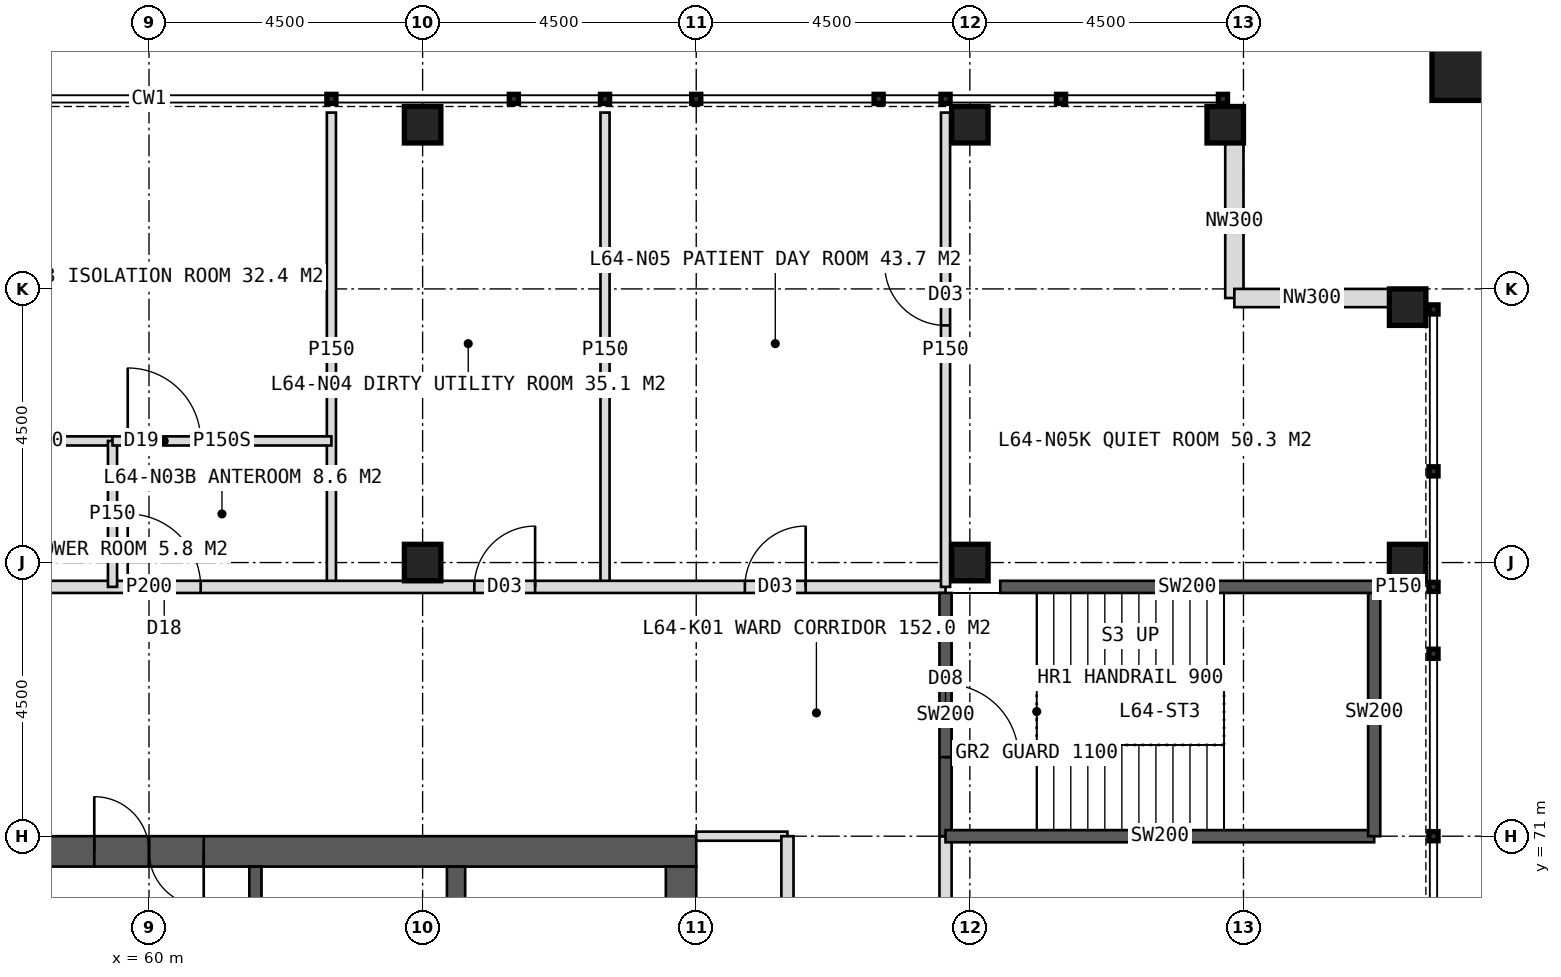
"""IFC4 building model, lengths in metres.
Left out: names, types, materials, properties, quantities, classifications, styles, units other than length and angle.
Written with IfcOpenShell. Run it as: python <this file> out.ifc"""

import sys

from ifc_helpers import new_model, si_unit, direction, frame, frame_2d, origin, origin_2d, place, context, subcontext, project, spatial, rectangle, hollow_rectangle, extrude, element, fill, save


model = new_model("IFC4")
c1 = context("Model", 3, precision=1e-05, world=origin(), true_north=direction((0.0, 1.0)))
c2 = subcontext(c1, "Body", "Model", "MODEL_VIEW")
j1 = project(units=[si_unit("LENGTHUNIT", "METRE"), si_unit("PLANEANGLEUNIT", "RADIAN")], contexts=[c1])
p1 = place(None, origin())
s1 = spatial("IfcSite", under=j1, at=p1, CompositionType="ELEMENT")
p2 = place(p1, origin())
s2 = spatial("IfcBuilding", under=s1, at=p2, CompositionType="ELEMENT")
p3 = place(p2, frame((0.0, 0.0, 266.0)))
s3 = spatial("IfcBuildingStorey", under=s2, at=p3, CompositionType="ELEMENT", Elevation=266.0)
p4 = place(p3, frame((51.0, 70.75, 0.0), z_axis=(0.0, 0.0, 1.0), x_axis=(1.0, 0.0, 0.0)))
e1 = element("IfcWall", 1, at=p4, inside=s3, PredefinedType="SHEAR", context=c2, shape_type="SweptSolid", body=[
    extrude(rectangle(XDim=18.0, YDim=0.5, at=frame_2d((9.0, 0.0))), origin(), (0.0, 0.0, 1.0), 4.0),
])
p5 = place(p4, frame((8.1, 0.0, 0.0)))
e2 = element("IfcOpeningElement", 2, at=p5, cuts=e1, PredefinedType="OPENING", context=c2, shape_type="SweptSolid", body=[
    extrude(rectangle(XDim=1.8, YDim=2.2, at=frame_2d((0.9, 1.1))), frame((0.0, 0.26, 0.0), z_axis=(0.0, -1.0, 0.0), x_axis=(1.0, 0.0, 0.0)), (0.0, 0.0, 1.0), 0.52),
])
p6 = place(p3, frame((68.75, 53.5, 0.0), z_axis=(0.0, 0.0, 1.0), x_axis=(0.0, 1.0, 0.0)))
e3 = element("IfcWall", 3, at=p6, inside=s3, PredefinedType="SHEAR", context=c2, shape_type="SweptSolid", body=[
    extrude(rectangle(XDim=17.0, YDim=0.5, at=frame_2d((8.5, 0.0))), origin(), (0.0, 0.0, 1.0), 4.0),
])
p7 = place(p6, frame((9.6, 0.0, 0.0)))
e4 = element("IfcOpeningElement", 4, at=p7, cuts=e3, PredefinedType="OPENING", context=c2, shape_type="SweptSolid", body=[
    extrude(rectangle(XDim=1.5, YDim=2.2, at=frame_2d((0.75, 1.1))), frame((0.0, 0.26, 0.0), z_axis=(0.0, -1.0, 0.0), x_axis=(1.0, 0.0, 0.0)), (0.0, 0.0, 1.0), 0.52),
])
p8 = place(p3, frame((65.05, 53.5, 0.0), z_axis=(0.0, 0.0, 1.0), x_axis=(0.0, 1.0, 0.0)))
e5 = element("IfcWall", 5, at=p8, inside=s3, PredefinedType="SHEAR", context=c2, shape_type="SweptSolid", body=[
    extrude(rectangle(XDim=17.0, YDim=0.3, at=frame_2d((8.5, 0.0))), origin(), (0.0, 0.0, 1.0), 4.0),
])
p9 = place(p3, frame((61.75, 53.5, 0.0), z_axis=(0.0, 0.0, 1.0), x_axis=(0.0, 1.0, 0.0)))
e6 = element("IfcWall", 6, at=p9, inside=s3, PredefinedType="SHEAR", context=c2, shape_type="SweptSolid", body=[
    extrude(rectangle(XDim=17.0, YDim=0.2, at=frame_2d((8.5, 0.0))), origin(), (0.0, 0.0, 1.0), 4.0),
])
p10 = place(p9, frame((0.6, 0.0, 0.0)))
e7 = element("IfcOpeningElement", 7, at=p10, cuts=e6, PredefinedType="OPENING", context=c2, shape_type="SweptSolid", body=[
    extrude(rectangle(XDim=1.0, YDim=2.1, at=frame_2d((0.5, 1.05))), frame((0.0, 0.11, 0.0), z_axis=(0.0, -1.0, 0.0), x_axis=(1.0, 0.0, 0.0)), (0.0, 0.0, 1.0), 0.22),
])
p11 = place(p9, frame((2.75, 0.0, 0.0)))
e8 = element("IfcOpeningElement", 8, at=p11, cuts=e6, PredefinedType="OPENING", context=c2, shape_type="SweptSolid", body=[
    extrude(rectangle(XDim=1.0, YDim=2.1, at=frame_2d((0.5, 1.05))), frame((0.0, 0.11, 0.0), z_axis=(0.0, -1.0, 0.0), x_axis=(1.0, 0.0, 0.0)), (0.0, 0.0, 1.0), 0.22),
])
p12 = place(p9, frame((4.824, 0.0, 0.0)))
e9 = element("IfcOpeningElement", 9, at=p12, cuts=e6, PredefinedType="OPENING", context=c2, shape_type="SweptSolid", body=[
    extrude(rectangle(XDim=1.0, YDim=2.1, at=frame_2d((0.5, 1.05))), frame((0.0, 0.11, 0.0), z_axis=(0.0, -1.0, 0.0), x_axis=(1.0, 0.0, 0.0)), (0.0, 0.0, 1.0), 0.22),
])
p13 = place(p9, frame((6.924, 0.0, 0.0)))
e10 = element("IfcOpeningElement", 10, at=p13, cuts=e6, PredefinedType="OPENING", context=c2, shape_type="SweptSolid", body=[
    extrude(rectangle(XDim=1.0, YDim=2.1, at=frame_2d((0.5, 1.05))), frame((0.0, 0.11, 0.0), z_axis=(0.0, -1.0, 0.0), x_axis=(1.0, 0.0, 0.0)), (0.0, 0.0, 1.0), 0.22),
])
p14 = place(p9, frame((10.025, 0.0, 0.0)))
e11 = element("IfcOpeningElement", 11, at=p14, cuts=e6, PredefinedType="OPENING", context=c2, shape_type="SweptSolid", body=[
    extrude(rectangle(XDim=1.4, YDim=2.2, at=frame_2d((0.7, 1.1))), frame((0.0, 0.11, 0.0), z_axis=(0.0, -1.0, 0.0), x_axis=(1.0, 0.0, 0.0)), (0.0, 0.0, 1.0), 0.22),
])
p15 = place(p9, frame((14.325, 0.0, 0.0)))
e12 = element("IfcOpeningElement", 12, at=p15, cuts=e6, PredefinedType="OPENING", context=c2, shape_type="SweptSolid", body=[
    extrude(rectangle(XDim=1.4, YDim=2.2, at=frame_2d((0.7, 1.1))), frame((0.0, 0.11, 0.0), z_axis=(0.0, -1.0, 0.0), x_axis=(1.0, 0.0, 0.0)), (0.0, 0.0, 1.0), 0.22),
])
for number, where, z_axis, x_axis in (
    (13, (73.5, 75.5, 0.0), (0.0, 0.0, 1.0), (1.0, 0.0, 0.0)),
    (14, (64.5, 75.5, 0.0), (0.0, 0.0, 1.0), (1.0, 0.0, 0.0)),
    (15, (64.5, 82.7, 0.0), (0.0, 0.0, 1.0), (1.0, 0.0, 0.0)),
    (16, (73.5, 82.7, 0.0), (0.0, 0.0, 1.0), (1.0, 0.0, 0.0)),
    (17, (80.7, 75.5, 0.0), (0.0, 0.0, 1.0), (1.0, 0.0, 0.0)),
    (18, (77.7, 82.7, 0.0), (0.0, 0.0, 1.0), (1.0, 0.0, 0.0)),
    (19, (80.7, 79.7, 0.0), (0.0, 0.0, 1.0), (1.0, 0.0, 0.0)),
):
    element("IfcColumn", number, at=place(p3, frame(where, z_axis=z_axis, x_axis=x_axis)), inside=s3, PredefinedType="COLUMN", context=c2, shape_type="SweptSolid", body=[
        extrude(hollow_rectangle(XDim=0.6, YDim=0.6, WallThickness=0.04, at=origin_2d()), origin(), (0.0, 0.0, 1.0), 4.0),
    ])
p16 = place(p3, frame((81.6, 83.6, 0.0), z_axis=(0.0, 0.0, 1.0), x_axis=(1.0, 0.0, 0.0)))
e20 = element("IfcColumn", 20, at=p16, inside=s3, PredefinedType="COLUMN", context=c2, shape_type="SweptSolid", body=[
    extrude(hollow_rectangle(XDim=1.0, YDim=1.0, WallThickness=0.06, at=origin_2d()), origin(), (0.0, 0.0, 1.0), 4.0),
])
for number, where, z_axis, x_axis in (
    (21, (77.85, 82.4, 0.0), (0.0, 0.0, 1.0), (0.0, -1.0, 0.0)),
    (22, (77.85, 79.85, 0.0), (0.0, 0.0, 1.0), (1.0, 0.0, 0.0)),
):
    element("IfcWall", number, at=place(p3, frame(where, z_axis=z_axis, x_axis=x_axis)), inside=s3, PredefinedType="ELEMENTEDWALL", context=c2, shape_type="SweptSolid", body=[
        extrude(rectangle(XDim=2.55, YDim=0.3, at=frame_2d((1.275, 0.0))), origin(), (0.0, 0.0, 1.0), 2.95),
    ])
for number, where, z_axis, x_axis in (
    (23, (63.0, 75.1, 0.0), (0.0, 0.0, 1.0), (0.0, 1.0, 0.0)),
    (24, (67.5, 75.1, 0.0), (0.0, 0.0, 1.0), (0.0, 1.0, 0.0)),
):
    element("IfcWall", number, at=place(p3, frame(where, z_axis=z_axis, x_axis=x_axis)), inside=s3, PredefinedType="PARTITIONING", context=c2, shape_type="SweptSolid", body=[
        extrude(rectangle(XDim=7.8, YDim=0.15, at=frame_2d((3.9, 0.0))), origin(), (0.0, 0.0, 1.0), 3.75),
    ])
p17 = place(p3, frame((46.9, 75.1, 0.0), z_axis=(0.0, 0.0, 1.0), x_axis=(1.0, 0.0, 0.0)))
e25 = element("IfcWall", 25, at=p17, inside=s3, PredefinedType="PARTITIONING", context=c2, shape_type="SweptSolid", body=[
    extrude(rectangle(XDim=26.2, YDim=0.2, at=frame_2d((13.1, 0.0))), origin(), (0.0, 0.0, 1.0), 3.75),
])
p18 = place(p17, frame((1.55, 0.0, 0.0)))
e26 = element("IfcOpeningElement", 26, at=p18, cuts=e25, PredefinedType="OPENING", context=c2, shape_type="SweptSolid", body=[
    extrude(rectangle(XDim=1.0, YDim=2.1, at=frame_2d((0.5, 1.05))), frame((0.0, 0.11, 0.0), z_axis=(0.0, -1.0, 0.0), x_axis=(1.0, 0.0, 0.0)), (0.0, 0.0, 1.0), 0.22),
])
p19 = place(p17, frame((6.6, 0.0, 0.0)))
e27 = element("IfcOpeningElement", 27, at=p19, cuts=e25, PredefinedType="OPENING", context=c2, shape_type="SweptSolid", body=[
    extrude(rectangle(XDim=1.0, YDim=2.1, at=frame_2d((0.5, 1.05))), frame((0.0, 0.11, 0.0), z_axis=(0.0, -1.0, 0.0), x_axis=(1.0, 0.0, 0.0)), (0.0, 0.0, 1.0), 0.22),
])
p20 = place(p17, frame((12.75, 0.0, 0.0)))
e28 = element("IfcOpeningElement", 28, at=p20, cuts=e25, PredefinedType="OPENING", context=c2, shape_type="SweptSolid", body=[
    extrude(rectangle(XDim=1.2, YDim=2.2, at=frame_2d((0.6, 1.1))), frame((0.0, 0.11, 0.0), z_axis=(0.0, -1.0, 0.0), x_axis=(1.0, 0.0, 0.0)), (0.0, 0.0, 1.0), 0.22),
])
p21 = place(p17, frame((18.45, 0.0, 0.0)))
e29 = element("IfcOpeningElement", 29, at=p21, cuts=e25, PredefinedType="OPENING", context=c2, shape_type="SweptSolid", body=[
    extrude(rectangle(XDim=1.0, YDim=2.1, at=frame_2d((0.5, 1.05))), frame((0.0, 0.11, 0.0), z_axis=(0.0, -1.0, 0.0), x_axis=(1.0, 0.0, 0.0)), (0.0, 0.0, 1.0), 0.22),
])
p22 = place(p17, frame((22.9, 0.0, 0.0)))
e30 = element("IfcOpeningElement", 30, at=p22, cuts=e25, PredefinedType="OPENING", context=c2, shape_type="SweptSolid", body=[
    extrude(rectangle(XDim=1.0, YDim=2.1, at=frame_2d((0.5, 1.05))), frame((0.0, 0.11, 0.0), z_axis=(0.0, -1.0, 0.0), x_axis=(1.0, 0.0, 0.0)), (0.0, 0.0, 1.0), 0.22),
])
p23 = place(p3, frame((57.0, 77.5, 0.0), z_axis=(0.0, 0.0, 1.0), x_axis=(1.0, 0.0, 0.0)))
e31 = element("IfcWall", 31, at=p23, inside=s3, PredefinedType="PARTITIONING", context=c2, shape_type="SweptSolid", body=[
    extrude(rectangle(XDim=2.4, YDim=0.15, at=frame_2d((1.2, 0.0))), origin(), (0.0, 0.0, 1.0), 3.75),
])
p24 = place(p23, frame((0.35, 0.0, 0.0)))
e32 = element("IfcOpeningElement", 32, at=p24, cuts=e31, PredefinedType="OPENING", context=c2, shape_type="SweptSolid", body=[
    extrude(rectangle(XDim=0.9, YDim=2.1, at=frame_2d((0.45, 1.05))), frame((0.0, 0.085, 0.0), z_axis=(0.0, -1.0, 0.0), x_axis=(1.0, 0.0, 0.0)), (0.0, 0.0, 1.0), 0.17),
])
p25 = place(p3, frame((59.4, 75.1, 0.0), z_axis=(0.0, 0.0, 1.0), x_axis=(0.0, 1.0, 0.0)))
e33 = element("IfcWall", 33, at=p25, inside=s3, PredefinedType="PARTITIONING", context=c2, shape_type="SweptSolid", body=[
    extrude(rectangle(XDim=2.4, YDim=0.15, at=frame_2d((1.2, 0.0))), origin(), (0.0, 0.0, 1.0), 3.75),
])
p26 = place(p3, frame((59.4, 77.5, 0.0), z_axis=(0.0, 0.0, 1.0), x_axis=(1.0, 0.0, 0.0)))
e34 = element("IfcWall", 34, at=p26, inside=s3, PredefinedType="PARTITIONING", context=c2, shape_type="SweptSolid", body=[
    extrude(rectangle(XDim=3.6, YDim=0.15, at=frame_2d((1.8, 0.0))), origin(), (0.0, 0.0, 1.0), 3.75),
])
p27 = place(p26, frame((0.25, 0.0, 0.0)))
e35 = element("IfcOpeningElement", 35, at=p27, cuts=e34, PredefinedType="OPENING", context=c2, shape_type="SweptSolid", body=[
    extrude(rectangle(XDim=1.2, YDim=2.2, at=frame_2d((0.6, 1.1))), frame((0.0, 0.085, 0.0), z_axis=(0.0, -1.0, 0.0), x_axis=(1.0, 0.0, 0.0)), (0.0, 0.0, 1.0), 0.17),
])
p28 = place(p3, frame((73.1, 75.1, 0.0), z_axis=(0.0, 0.0, 1.0), x_axis=(0.0, 1.0, 0.0)))
e36 = element("IfcWall", 36, at=p28, inside=s3, PredefinedType="PARTITIONING", context=c2, shape_type="SweptSolid", body=[
    extrude(rectangle(XDim=7.8, YDim=0.15, at=frame_2d((3.9, 0.0))), origin(), (0.0, 0.0, 1.0), 3.75),
])
p29 = place(p28, frame((4.3, 0.0, 0.0)))
e37 = element("IfcOpeningElement", 37, at=p29, cuts=e36, PredefinedType="OPENING", context=c2, shape_type="SweptSolid", body=[
    extrude(rectangle(XDim=1.0, YDim=2.1, at=frame_2d((0.5, 1.05))), frame((0.0, 0.085, 0.0), z_axis=(0.0, -1.0, 0.0), x_axis=(1.0, 0.0, 0.0)), (0.0, 0.0, 1.0), 0.17),
])
p30 = place(p3, frame((73.1, 71.0, 0.0), z_axis=(0.0, 0.0, 1.0), x_axis=(0.0, -1.0, 0.0)))
e38 = element("IfcWall", 38, at=p30, inside=s3, PredefinedType="PARTITIONING", context=c2, shape_type="SweptSolid", body=[
    extrude(rectangle(XDim=22.1, YDim=0.2, at=frame_2d((11.05, 0.0))), origin(), (0.0, 0.0, 1.0), 3.75),
])
p31 = place(p30, frame((2.65, 0.0, 0.0)))
e39 = element("IfcOpeningElement", 39, at=p31, cuts=e38, PredefinedType="OPENING", context=c2, shape_type="SweptSolid", body=[
    extrude(rectangle(XDim=1.0, YDim=2.1, at=frame_2d((0.5, 1.05))), frame((0.0, 0.11, 0.0), z_axis=(0.0, -1.0, 0.0), x_axis=(1.0, 0.0, 0.0)), (0.0, 0.0, 1.0), 0.22),
])
p32 = place(p30, frame((7.0, 0.0, 0.0)))
e40 = element("IfcOpeningElement", 40, at=p32, cuts=e38, PredefinedType="OPENING", context=c2, shape_type="SweptSolid", body=[
    extrude(rectangle(XDim=1.0, YDim=2.1, at=frame_2d((0.5, 1.05))), frame((0.0, 0.11, 0.0), z_axis=(0.0, -1.0, 0.0), x_axis=(1.0, 0.0, 0.0)), (0.0, 0.0, 1.0), 0.22),
])
p33 = place(p30, frame((14.35, 0.0, 0.0)))
e41 = element("IfcOpeningElement", 41, at=p33, cuts=e38, PredefinedType="OPENING", context=c2, shape_type="SweptSolid", body=[
    extrude(rectangle(XDim=1.2, YDim=2.2, at=frame_2d((0.6, 1.1))), frame((0.0, 0.11, 0.0), z_axis=(0.0, -1.0, 0.0), x_axis=(1.0, 0.0, 0.0)), (0.0, 0.0, 1.0), 0.22),
])
p34 = place(p30, frame((18.7, 0.0, 0.0)))
e42 = element("IfcOpeningElement", 42, at=p34, cuts=e38, PredefinedType="OPENING", context=c2, shape_type="SweptSolid", body=[
    extrude(rectangle(XDim=1.2, YDim=2.2, at=frame_2d((0.6, 1.1))), frame((0.0, 0.11, 0.0), z_axis=(0.0, -1.0, 0.0), x_axis=(1.0, 0.0, 0.0)), (0.0, 0.0, 1.0), 0.22),
])
p35 = place(p3, frame((80.2, 75.1, 0.0), z_axis=(0.0, 0.0, 1.0), x_axis=(1.0, 0.0, 0.0)))
e43 = element("IfcWall", 43, at=p35, inside=s3, PredefinedType="PARTITIONING", context=c2, shape_type="SweptSolid", body=[
    extrude(rectangle(XDim=0.7, YDim=0.15, at=frame_2d((0.35, 0.0))), origin(), (0.0, 0.0, 1.0), 3.75),
])
p36 = place(p3, frame((69.0, 71.0, 0.0), z_axis=(0.0, 0.0, 1.0), x_axis=(1.0, 0.0, 0.0)))
e44 = element("IfcWall", 44, at=p36, inside=s3, PredefinedType="PARTITIONING", context=c2, shape_type="SweptSolid", body=[
    extrude(rectangle(XDim=1.5, YDim=0.15, at=frame_2d((0.75, 0.0))), origin(), (0.0, 0.0, 1.0), 3.75),
])
p37 = place(p3, frame((70.5, 71.0, 0.0), z_axis=(0.0, 0.0, 1.0), x_axis=(0.0, -1.0, 0.0)))
e45 = element("IfcWall", 45, at=p37, inside=s3, PredefinedType="PARTITIONING", context=c2, shape_type="SweptSolid", body=[
    extrude(rectangle(XDim=5.0, YDim=0.2, at=frame_2d((2.5, 0.0))), origin(), (0.0, 0.0, 1.0), 3.75),
])
p38 = place(p37, frame((2.0, 0.0, 0.0)))
e46 = element("IfcOpeningElement", 46, at=p38, cuts=e45, PredefinedType="OPENING", context=c2, shape_type="SweptSolid", body=[
    extrude(rectangle(XDim=1.0, YDim=2.1, at=frame_2d((0.5, 1.05))), frame((0.0, 0.11, 0.0), z_axis=(0.0, -1.0, 0.0), x_axis=(1.0, 0.0, 0.0)), (0.0, 0.0, 1.0), 0.22),
])
p39 = place(p3, frame((73.1, 75.0, 0.0), z_axis=(0.0, 0.0, 1.0), x_axis=(0.0, -1.0, 0.0)))
e47 = element("IfcWall", 47, at=p39, inside=s3, PredefinedType="SOLIDWALL", context=c2, shape_type="SweptSolid", body=[
    extrude(rectangle(XDim=4.0, YDim=0.2, at=frame_2d((2.0, 0.0))), origin(), (0.0, 0.0, 1.0), 3.75),
])
p40 = place(p39, frame((1.5, 0.0, 0.0)))
e48 = element("IfcOpeningElement", 48, at=p40, cuts=e47, PredefinedType="OPENING", context=c2, shape_type="SweptSolid", body=[
    extrude(rectangle(XDim=1.2, YDim=2.1, at=frame_2d((0.6, 1.05))), frame((0.0, 0.11, 0.0), z_axis=(0.0, -1.0, 0.0), x_axis=(1.0, 0.0, 0.0)), (0.0, 0.0, 1.0), 0.22),
])
p41 = place(p3, frame((73.1, 71.0, 0.0), z_axis=(0.0, 0.0, 1.0), x_axis=(1.0, 0.0, 0.0)))
e49 = element("IfcWall", 49, at=p41, inside=s3, PredefinedType="SOLIDWALL", context=c2, shape_type="SweptSolid", body=[
    extrude(rectangle(XDim=7.05, YDim=0.2, at=frame_2d((3.525, 0.0))), origin(), (0.0, 0.0, 1.0), 3.75),
])
p42 = place(p3, frame((80.15, 71.0, 0.0), z_axis=(0.0, 0.0, 1.0), x_axis=(0.0, 1.0, 0.0)))
e50 = element("IfcWall", 50, at=p42, inside=s3, PredefinedType="SOLIDWALL", context=c2, shape_type="SweptSolid", body=[
    extrude(rectangle(XDim=4.1, YDim=0.2, at=frame_2d((2.05, 0.0))), origin(), (0.0, 0.0, 1.0), 3.75),
])
p43 = place(p3, frame((74.0, 75.1, 0.0), z_axis=(0.0, 0.0, 1.0), x_axis=(1.0, 0.0, 0.0)))
e51 = element("IfcWall", 51, at=p43, inside=s3, PredefinedType="SOLIDWALL", context=c2, shape_type="SweptSolid", body=[
    extrude(rectangle(XDim=6.15, YDim=0.2, at=frame_2d((3.075, 0.0))), origin(), (0.0, 0.0, 1.0), 3.75),
])
p44 = place(p27, origin())
e52 = element("IfcDoor", 52, at=p44, inside=s3, OperationType="SINGLE_SWING_LEFT", PredefinedType="DOOR", context=c2, shape_type="SweptSolid", body=[
    extrude(rectangle(XDim=1.2, YDim=2.2, at=frame_2d((0.6, 1.1))), frame((0.0, 0.025, 0.0), z_axis=(0.0, -1.0, 0.0), x_axis=(1.0, 0.0, 0.0)), (0.0, 0.0, 1.0), 0.05),
])
fill(e35, e52)
p45 = place(p20, origin())
e53 = element("IfcDoor", 53, at=p45, inside=s3, OperationType="SINGLE_SWING_LEFT", PredefinedType="DOOR", context=c2, shape_type="SweptSolid", body=[
    extrude(rectangle(XDim=1.2, YDim=2.2, at=frame_2d((0.6, 1.1))), frame((0.0, 0.025, 0.0), z_axis=(0.0, -1.0, 0.0), x_axis=(1.0, 0.0, 0.0)), (0.0, 0.0, 1.0), 0.05),
])
fill(e28, e53)
p46 = place(p21, origin())
e54 = element("IfcDoor", 54, at=p46, inside=s3, OperationType="SINGLE_SWING_RIGHT", PredefinedType="DOOR", context=c2, shape_type="SweptSolid", body=[
    extrude(rectangle(XDim=1.0, YDim=2.1, at=frame_2d((0.5, 1.05))), frame((0.0, 0.025, 0.0), z_axis=(0.0, -1.0, 0.0), x_axis=(1.0, 0.0, 0.0)), (0.0, 0.0, 1.0), 0.05),
])
fill(e29, e54)
p47 = place(p29, origin())
e55 = element("IfcDoor", 55, at=p47, inside=s3, OperationType="SINGLE_SWING_RIGHT", PredefinedType="DOOR", context=c2, shape_type="SweptSolid", body=[
    extrude(rectangle(XDim=1.0, YDim=2.1, at=frame_2d((0.5, 1.05))), frame((0.0, 0.025, 0.0), z_axis=(0.0, -1.0, 0.0), x_axis=(1.0, 0.0, 0.0)), (0.0, 0.0, 1.0), 0.05),
])
fill(e37, e55)
p48 = place(p22, origin())
e56 = element("IfcDoor", 56, at=p48, inside=s3, OperationType="SINGLE_SWING_RIGHT", PredefinedType="DOOR", context=c2, shape_type="SweptSolid", body=[
    extrude(rectangle(XDim=1.0, YDim=2.1, at=frame_2d((0.5, 1.05))), frame((0.0, 0.025, 0.0), z_axis=(0.0, -1.0, 0.0), x_axis=(1.0, 0.0, 0.0)), (0.0, 0.0, 1.0), 0.05),
])
fill(e30, e56)
p49 = place(p5, origin())
e57 = element("IfcDoor", 57, at=p49, inside=s3, OperationType="DOUBLE_DOOR_SINGLE_SWING", PredefinedType="DOOR", context=c2, shape_type="SweptSolid", body=[
    extrude(rectangle(XDim=1.8, YDim=2.2, at=frame_2d((0.9, 1.1))), frame((0.0, 0.025, 0.0), z_axis=(0.0, -1.0, 0.0), x_axis=(1.0, 0.0, 0.0)), (0.0, 0.0, 1.0), 0.05),
])
fill(e2, e57)
p50 = place(p40, origin())
e58 = element("IfcDoor", 58, at=p50, inside=s3, OperationType="SINGLE_SWING_RIGHT", PredefinedType="DOOR", context=c2, shape_type="SweptSolid", body=[
    extrude(rectangle(XDim=1.2, YDim=2.1, at=frame_2d((0.6, 1.05))), frame((0.0, 0.025, 0.0), z_axis=(0.0, -1.0, 0.0), x_axis=(1.0, 0.0, 0.0)), (0.0, 0.0, 1.0), 0.05),
])
fill(e48, e58)
save(model, sys.argv[1])
